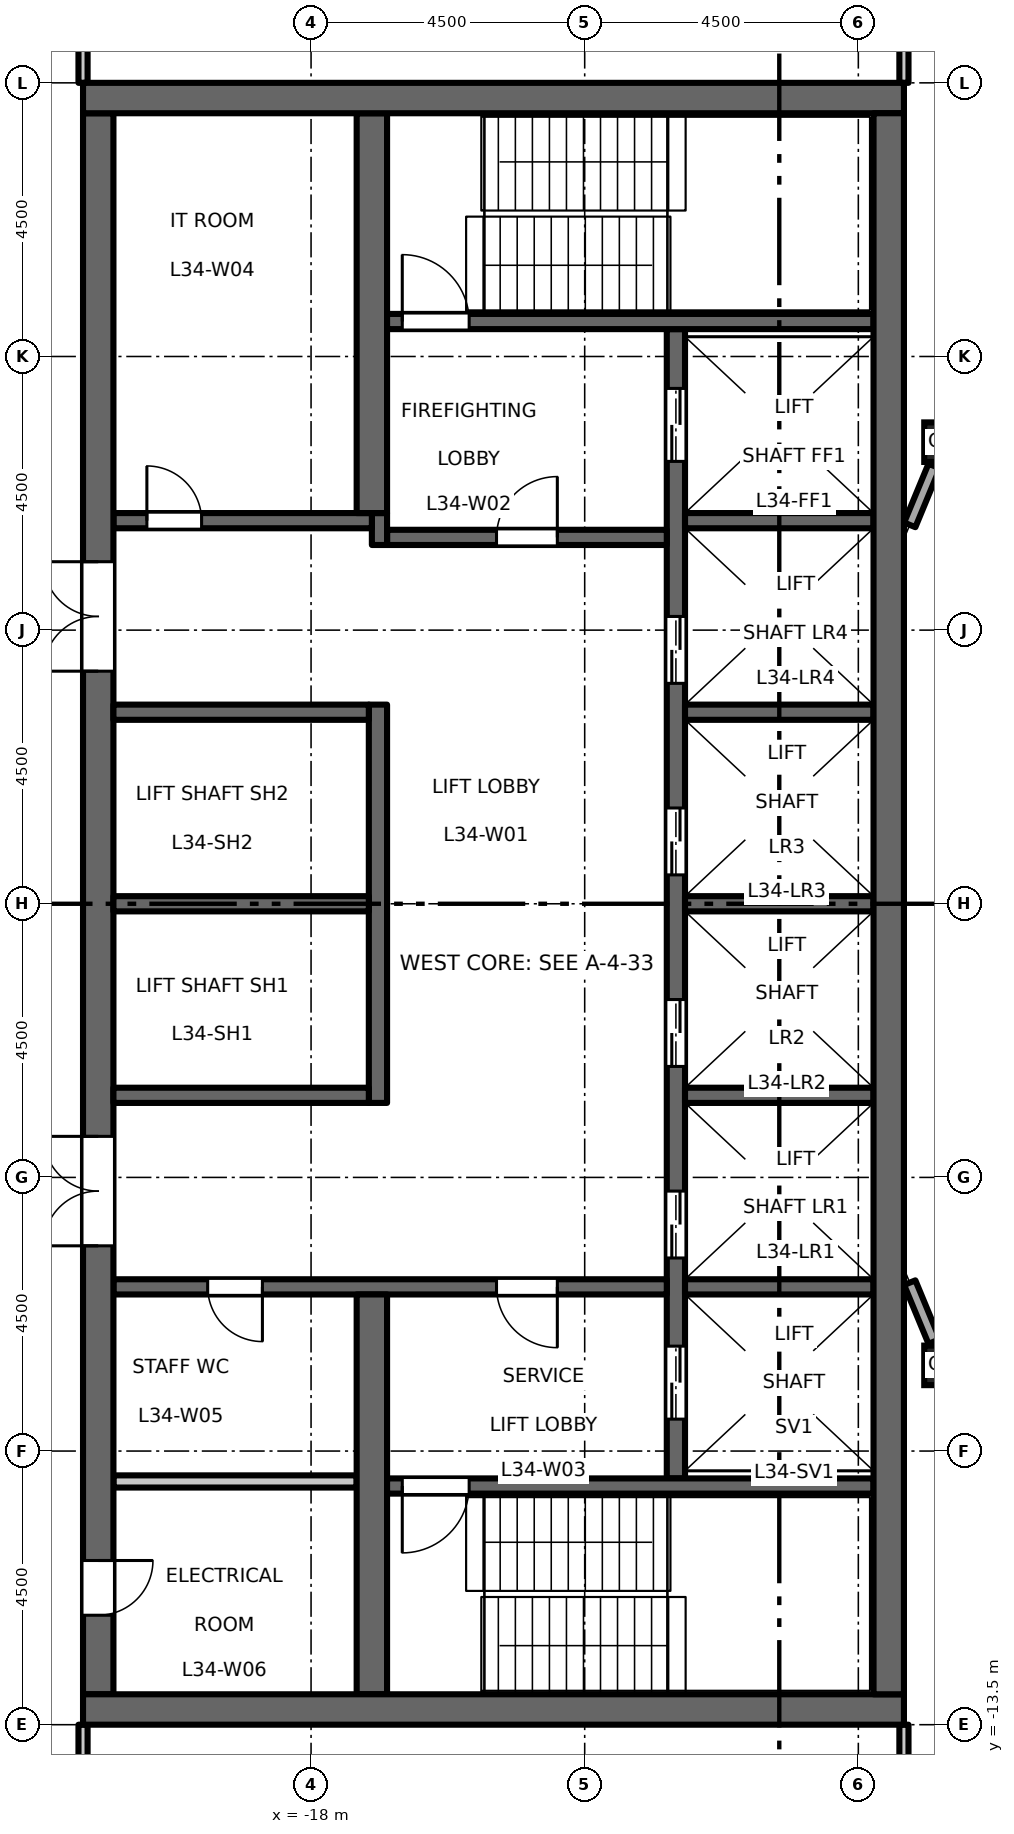
"""IFC4 building model, lengths in metres.
Left out: names, types, materials, properties, quantities, classifications, styles, units other than length and angle.
Written with IfcOpenShell. Run it as: python <this file> out.ifc"""

import sys

from ifc_helpers import new_model, si_unit, direction, frame, frame_2d, origin, origin_2d, place, context, subcontext, project, spatial, rectangle, hollow_rectangle, extrude, element, fill, save


model = new_model("IFC4")
c1 = context("Model", 3, precision=1e-05, world=origin(), true_north=direction((0.0, 1.0)))
c2 = subcontext(c1, "Body", "Model", "MODEL_VIEW")
j1 = project(units=[si_unit("LENGTHUNIT", "METRE"), si_unit("PLANEANGLEUNIT", "RADIAN")], contexts=[c1])
p1 = place(None, origin())
s1 = spatial("IfcSite", under=j1, at=p1, CompositionType="ELEMENT")
p2 = place(p1, origin())
s2 = spatial("IfcBuilding", under=s1, at=p2, CompositionType="ELEMENT")
p3 = place(p2, frame((0.0, 0.0, 158.7)))
s3 = spatial("IfcBuildingStorey", under=s2, at=p3, CompositionType="ELEMENT", Elevation=158.7)
for number, where, z_axis, x_axis in (
    (1, (-7.591, -7.591, 0.0), (0.0, 0.0, 1.0), (1.0, 0.0, 0.0)),
    (2, (-7.591, 7.591, 0.0), (0.0, 0.0, 1.0), (1.0, 0.0, 0.0)),
):
    element("IfcColumn", number, at=place(p3, frame(where, z_axis=z_axis, x_axis=x_axis)), inside=s3, PredefinedType="COLUMN", context=c2, shape_type="SweptSolid", body=[
        extrude(hollow_rectangle(XDim=0.65, YDim=0.65, WallThickness=0.036, at=origin_2d()), origin(), (0.0, 0.0, 1.0), 4.5),
    ])
p4 = place(p3, frame((-12.0, -9.45, 0.0), z_axis=(0.0, 0.0, 1.0), x_axis=(0.0, 1.0, 0.0)))
e3 = element("IfcWall", 3, at=p4, inside=s3, PredefinedType="SHEAR", context=c2, shape_type="SweptSolid", body=[
    extrude(rectangle(XDim=18.9, YDim=0.3, at=frame_2d((9.45, 0.0))), origin(), (0.0, 0.0, 1.0), 4.35),
])
p5 = place(p4, frame((3.625, 0.0, 0.0)))
e4 = element("IfcOpeningElement", 4, at=p5, cuts=e3, PredefinedType="OPENING", context=c2, shape_type="SweptSolid", body=[
    extrude(rectangle(XDim=1.1, YDim=2.1, at=frame_2d((0.55, 1.05))), frame((0.0, 0.16, 0.0), z_axis=(0.0, -1.0, 0.0), x_axis=(1.0, 0.0, 0.0)), (0.0, 0.0, 1.0), 0.32),
])
p6 = place(p4, frame((6.775, 0.0, 0.0)))
e5 = element("IfcOpeningElement", 5, at=p6, cuts=e3, PredefinedType="OPENING", context=c2, shape_type="SweptSolid", body=[
    extrude(rectangle(XDim=1.1, YDim=2.1, at=frame_2d((0.55, 1.05))), frame((0.0, 0.16, 0.0), z_axis=(0.0, -1.0, 0.0), x_axis=(1.0, 0.0, 0.0)), (0.0, 0.0, 1.0), 0.32),
])
p7 = place(p4, frame((9.925, 0.0, 0.0)))
e6 = element("IfcOpeningElement", 6, at=p7, cuts=e3, PredefinedType="OPENING", context=c2, shape_type="SweptSolid", body=[
    extrude(rectangle(XDim=1.1, YDim=2.1, at=frame_2d((0.55, 1.05))), frame((0.0, 0.16, 0.0), z_axis=(0.0, -1.0, 0.0), x_axis=(1.0, 0.0, 0.0)), (0.0, 0.0, 1.0), 0.32),
])
p8 = place(p4, frame((13.075, 0.0, 0.0)))
e7 = element("IfcOpeningElement", 7, at=p8, cuts=e3, PredefinedType="OPENING", context=c2, shape_type="SweptSolid", body=[
    extrude(rectangle(XDim=1.1, YDim=2.1, at=frame_2d((0.55, 1.05))), frame((0.0, 0.16, 0.0), z_axis=(0.0, -1.0, 0.0), x_axis=(1.0, 0.0, 0.0)), (0.0, 0.0, 1.0), 0.32),
])
p9 = place(p4, frame((16.725, 0.0, 0.0)))
e8 = element("IfcOpeningElement", 8, at=p9, cuts=e3, PredefinedType="OPENING", context=c2, shape_type="SweptSolid", body=[
    extrude(rectangle(XDim=1.2, YDim=2.1, at=frame_2d((0.6, 1.05))), frame((0.0, 0.16, 0.0), z_axis=(0.0, -1.0, 0.0), x_axis=(1.0, 0.0, 0.0)), (0.0, 0.0, 1.0), 0.32),
])
p10 = place(p4, frame((0.975, 0.0, 0.0)))
e9 = element("IfcOpeningElement", 9, at=p10, cuts=e3, PredefinedType="OPENING", context=c2, shape_type="SweptSolid", body=[
    extrude(rectangle(XDim=1.2, YDim=2.1, at=frame_2d((0.6, 1.05))), frame((0.0, 0.16, 0.0), z_axis=(0.0, -1.0, 0.0), x_axis=(1.0, 0.0, 0.0)), (0.0, 0.0, 1.0), 0.32),
])
p11 = place(p3, frame((-12.15, 6.025, 0.0), z_axis=(0.0, 0.0, 1.0), x_axis=(-1.0, 0.0, 0.0)))
e10 = element("IfcWall", 10, at=p11, inside=s3, PredefinedType="SHEAR", context=c2, shape_type="SweptSolid", body=[
    extrude(rectangle(XDim=4.6, YDim=0.25, at=frame_2d((2.3, 0.0))), origin(), (0.0, 0.0, 1.0), 4.35),
])
p12 = place(p11, frame((1.8, 0.0, 0.0)))
e11 = element("IfcOpeningElement", 11, at=p12, cuts=e10, PredefinedType="OPENING", context=c2, shape_type="SweptSolid", body=[
    extrude(rectangle(XDim=1.0, YDim=2.1, at=frame_2d((0.5, 1.05))), frame((0.0, 0.135, 0.0), z_axis=(0.0, -1.0, 0.0), x_axis=(1.0, 0.0, 0.0)), (0.0, 0.0, 1.0), 0.27),
])
p13 = place(p3, frame((-16.875, 5.9, 0.0), z_axis=(0.0, 0.0, 1.0), x_axis=(0.0, 1.0, 0.0)))
e12 = element("IfcWall", 12, at=p13, inside=s3, PredefinedType="SHEAR", context=c2, shape_type="SweptSolid", body=[
    extrude(rectangle(XDim=0.525, YDim=0.25, at=frame_2d((0.263, 0.0))), origin(), (0.0, 0.0, 1.0), 4.35),
])
p14 = place(p3, frame((-17.0, 6.3, 0.0), z_axis=(0.0, 0.0, 1.0), x_axis=(-1.0, 0.0, 0.0)))
e13 = element("IfcWall", 13, at=p14, inside=s3, PredefinedType="SHEAR", context=c2, shape_type="SweptSolid", body=[
    extrude(rectangle(XDim=4.25, YDim=0.25, at=frame_2d((2.125, 0.0))), origin(), (0.0, 0.0, 1.0), 4.35),
])
p15 = place(p14, frame((2.8, 0.0, 0.0)))
e14 = element("IfcOpeningElement", 14, at=p15, cuts=e13, PredefinedType="OPENING", context=c2, shape_type="SweptSolid", body=[
    extrude(rectangle(XDim=0.9, YDim=2.1, at=frame_2d((0.45, 1.05))), frame((0.0, 0.135, 0.0), z_axis=(0.0, -1.0, 0.0), x_axis=(1.0, 0.0, 0.0)), (0.0, 0.0, 1.0), 0.27),
])
p16 = place(p3, frame((-12.15, -6.3, 0.0), z_axis=(0.0, 0.0, 1.0), x_axis=(-1.0, 0.0, 0.0)))
e15 = element("IfcWall", 15, at=p16, inside=s3, PredefinedType="SHEAR", context=c2, shape_type="SweptSolid", body=[
    extrude(rectangle(XDim=9.1, YDim=0.25, at=frame_2d((4.55, 0.0))), origin(), (0.0, 0.0, 1.0), 4.35),
])
p17 = place(p16, frame((1.8, 0.0, 0.0)))
e16 = element("IfcOpeningElement", 16, at=p17, cuts=e15, PredefinedType="OPENING", context=c2, shape_type="SweptSolid", body=[
    extrude(rectangle(XDim=1.0, YDim=2.1, at=frame_2d((0.5, 1.05))), frame((0.0, 0.135, 0.0), z_axis=(0.0, -1.0, 0.0), x_axis=(1.0, 0.0, 0.0)), (0.0, 0.0, 1.0), 0.27),
])
p18 = place(p16, frame((6.65, 0.0, 0.0)))
e17 = element("IfcOpeningElement", 17, at=p18, cuts=e15, PredefinedType="OPENING", context=c2, shape_type="SweptSolid", body=[
    extrude(rectangle(XDim=0.9, YDim=2.1, at=frame_2d((0.45, 1.05))), frame((0.0, 0.135, 0.0), z_axis=(0.0, -1.0, 0.0), x_axis=(1.0, 0.0, 0.0)), (0.0, 0.0, 1.0), 0.27),
])
p19 = place(p3, frame((-21.5, -13.0, 0.0), z_axis=(0.0, 0.0, 1.0), x_axis=(0.0, 1.0, 0.0)))
e18 = element("IfcWall", 18, at=p19, inside=s3, PredefinedType="SHEAR", context=c2, shape_type="SweptSolid", body=[
    extrude(rectangle(XDim=26.0, YDim=0.5, at=frame_2d((13.0, 0.0))), origin(), (0.0, 0.0, 1.0), 4.35),
])
p20 = place(p19, frame((16.825, 0.0, 0.0)))
e19 = element("IfcOpeningElement", 19, at=p20, cuts=e18, PredefinedType="OPENING", context=c2, shape_type="SweptSolid", body=[
    extrude(rectangle(XDim=1.8, YDim=2.1, at=frame_2d((0.9, 1.05))), frame((0.0, 0.26, 0.0), z_axis=(0.0, -1.0, 0.0), x_axis=(1.0, 0.0, 0.0)), (0.0, 0.0, 1.0), 0.52),
])
p21 = place(p19, frame((7.375, 0.0, 0.0)))
e20 = element("IfcOpeningElement", 20, at=p21, cuts=e18, PredefinedType="OPENING", context=c2, shape_type="SweptSolid", body=[
    extrude(rectangle(XDim=1.8, YDim=2.1, at=frame_2d((0.9, 1.05))), frame((0.0, 0.26, 0.0), z_axis=(0.0, -1.0, 0.0), x_axis=(1.0, 0.0, 0.0)), (0.0, 0.0, 1.0), 0.52),
])
p22 = place(p19, frame((1.3, 0.0, 0.0)))
e21 = element("IfcOpeningElement", 21, at=p22, cuts=e18, PredefinedType="OPENING", context=c2, shape_type="SweptSolid", body=[
    extrude(rectangle(XDim=0.9, YDim=2.1, at=frame_2d((0.45, 1.05))), frame((0.0, 0.26, 0.0), z_axis=(0.0, -1.0, 0.0), x_axis=(1.0, 0.0, 0.0)), (0.0, 0.0, 1.0), 0.52),
])
p23 = place(p3, frame((-17.25, -9.5, 0.0), z_axis=(0.0, 0.0, 1.0), x_axis=(-1.0, 0.0, 0.0)))
e22 = element("IfcWall", 22, at=p23, inside=s3, PredefinedType="PARTITIONING", context=c2, shape_type="SweptSolid", body=[
    extrude(rectangle(XDim=4.0, YDim=0.2, at=frame_2d((2.0, 0.0))), origin(), (0.0, 0.0, 1.0), 4.35),
])
p24 = place(p3, frame((-16.9, -3.275, 0.0), z_axis=(0.0, 0.0, 1.0), x_axis=(0.0, 1.0, 0.0)))
e23 = element("IfcWall", 23, at=p24, inside=s3, PredefinedType="SHEAR", context=c2, shape_type="SweptSolid", body=[
    extrude(rectangle(XDim=6.55, YDim=0.3, at=frame_2d((3.275, 0.0))), origin(), (0.0, 0.0, 1.0), 4.35),
])
for number, where, z_axis, x_axis in (
    (24, (-17.05, 0.0, 0.0), (0.0, 0.0, 1.0), (-1.0, 0.0, 0.0)),
    (25, (-17.05, 3.15, 0.0), (0.0, 0.0, 1.0), (-1.0, 0.0, 0.0)),
    (26, (-17.05, -3.15, 0.0), (0.0, 0.0, 1.0), (-1.0, 0.0, 0.0)),
):
    element("IfcWall", number, at=place(p3, frame(where, z_axis=z_axis, x_axis=x_axis)), inside=s3, PredefinedType="SHEAR", context=c2, shape_type="SweptSolid", body=[
        extrude(rectangle(XDim=4.2, YDim=0.25, at=frame_2d((2.1, 0.0))), origin(), (0.0, 0.0, 1.0), 4.35),
    ])
for number, where, z_axis, x_axis in (
    (27, (-17.0, 6.425, 0.0), (0.0, 0.0, 1.0), (0.0, 1.0, 0.0)),
    (28, (-17.0, -13.0, 0.0), (0.0, 0.0, 1.0), (0.0, 1.0, 0.0)),
):
    element("IfcWall", number, at=place(p3, frame(where, z_axis=z_axis, x_axis=x_axis)), inside=s3, PredefinedType="SHEAR", context=c2, shape_type="SweptSolid", body=[
        extrude(rectangle(XDim=6.575, YDim=0.5, at=frame_2d((3.288, 0.0))), origin(), (0.0, 0.0, 1.0), 4.35),
    ])
for number, where, z_axis, x_axis in (
    (29, (-8.75, 0.0, 0.0), (0.0, 0.0, 1.0), (-1.0, 0.0, 0.0)),
    (30, (-8.75, 3.15, 0.0), (0.0, 0.0, 1.0), (-1.0, 0.0, 0.0)),
    (31, (-8.75, 6.3, 0.0), (0.0, 0.0, 1.0), (-1.0, 0.0, 0.0)),
    (32, (-8.75, -3.15, 0.0), (0.0, 0.0, 1.0), (-1.0, 0.0, 0.0)),
    (33, (-8.75, -6.3, 0.0), (0.0, 0.0, 1.0), (-1.0, 0.0, 0.0)),
):
    element("IfcWall", number, at=place(p3, frame(where, z_axis=z_axis, x_axis=x_axis)), inside=s3, PredefinedType="SHEAR", context=c2, shape_type="SweptSolid", body=[
        extrude(rectangle(XDim=3.1, YDim=0.25, at=frame_2d((1.55, 0.0))), origin(), (0.0, 0.0, 1.0), 4.35),
    ])
p25 = place(p3, frame((-8.75, 9.575, 0.0), z_axis=(0.0, 0.0, 1.0), x_axis=(-1.0, 0.0, 0.0)))
e34 = element("IfcWall", 34, at=p25, inside=s3, PredefinedType="SHEAR", context=c2, shape_type="SweptSolid", body=[
    extrude(rectangle(XDim=8.0, YDim=0.25, at=frame_2d((4.0, 0.0))), origin(), (0.0, 0.0, 1.0), 4.35),
])
p26 = place(p25, frame((6.65, 0.0, 0.0)))
e35 = element("IfcOpeningElement", 35, at=p26, cuts=e34, PredefinedType="OPENING", context=c2, shape_type="SweptSolid", body=[
    extrude(rectangle(XDim=1.1, YDim=2.1, at=frame_2d((0.55, 1.05))), frame((0.0, 0.135, 0.0), z_axis=(0.0, -1.0, 0.0), x_axis=(1.0, 0.0, 0.0)), (0.0, 0.0, 1.0), 0.27),
])
p27 = place(p3, frame((-8.75, -9.575, 0.0), z_axis=(0.0, 0.0, 1.0), x_axis=(-1.0, 0.0, 0.0)))
e36 = element("IfcWall", 36, at=p27, inside=s3, PredefinedType="SHEAR", context=c2, shape_type="SweptSolid", body=[
    extrude(rectangle(XDim=8.0, YDim=0.25, at=frame_2d((4.0, 0.0))), origin(), (0.0, 0.0, 1.0), 4.35),
])
p28 = place(p27, frame((6.65, 0.0, 0.0)))
e37 = element("IfcOpeningElement", 37, at=p28, cuts=e36, PredefinedType="OPENING", context=c2, shape_type="SweptSolid", body=[
    extrude(rectangle(XDim=1.1, YDim=2.1, at=frame_2d((0.55, 1.05))), frame((0.0, 0.135, 0.0), z_axis=(0.0, -1.0, 0.0), x_axis=(1.0, 0.0, 0.0)), (0.0, 0.0, 1.0), 0.27),
])
for number, where, z_axis, x_axis in (
    (38, (-8.25, 13.25, 0.0), (0.0, 0.0, 1.0), (-1.0, 0.0, 0.0)),
    (39, (-8.25, -13.25, 0.0), (0.0, 0.0, 1.0), (-1.0, 0.0, 0.0)),
):
    element("IfcWall", number, at=place(p3, frame(where, z_axis=z_axis, x_axis=x_axis)), inside=s3, PredefinedType="SHEAR", context=c2, shape_type="SweptSolid", body=[
        extrude(rectangle(XDim=13.5, YDim=0.5, at=frame_2d((6.75, 0.0))), origin(), (0.0, 0.0, 1.0), 4.35),
    ])
p29 = place(p3, frame((-8.5, -13.0, 0.0), z_axis=(0.0, 0.0, 1.0), x_axis=(0.0, 1.0, 0.0)))
e40 = element("IfcWall", 40, at=p29, inside=s3, PredefinedType="SHEAR", context=c2, shape_type="SweptSolid", body=[
    extrude(rectangle(XDim=26.0, YDim=0.5, at=frame_2d((13.0, 0.0))), origin(), (0.0, 0.0, 1.0), 4.35),
])
for number, where, z_axis, x_axis in (
    (41, (-7.753, 7.199, 0.0), (0.0, 0.0, 1.0), (-0.383, -0.924, 0.0)),
    (42, (-8.154, -6.231, 0.0), (0.0, 0.0, 1.0), (0.383, -0.924, 0.0)),
):
    element("IfcWall", number, at=place(p3, frame(where, z_axis=z_axis, x_axis=x_axis)), inside=s3, PredefinedType="STANDARD", context=c2, shape_type="SweptSolid", body=[
        extrude(rectangle(XDim=1.048, YDim=0.2, at=frame_2d((0.524, 0.0))), origin(), (0.0, 0.0, 1.0), 3.826),
    ])
for number, where, z_axis, x_axis in (
    (43, (-21.75, -17.925, 0.0), (0.0, 0.0, 1.0), (0.0, 1.0, 0.0)),
    (44, (-21.75, 13.5, 0.0), (0.0, 0.0, 1.0), (0.0, 1.0, 0.0)),
    (45, (-8.25, -17.925, 0.0), (0.0, 0.0, 1.0), (0.0, 1.0, 0.0)),
    (46, (-8.25, 13.5, 0.0), (0.0, 0.0, 1.0), (0.0, 1.0, 0.0)),
):
    element("IfcWall", number, at=place(p3, frame(where, z_axis=z_axis, x_axis=x_axis)), inside=s3, PredefinedType="PARTITIONING", context=c2, shape_type="SweptSolid", body=[
        extrude(rectangle(XDim=4.425, YDim=0.15, at=frame_2d((2.212, 0.0))), origin(), (0.0, 0.0, 1.0), 4.35),
    ])
p30 = place(p12, origin())
e47 = element("IfcDoor", 47, at=p30, inside=s3, OperationType="SINGLE_SWING_LEFT", PredefinedType="DOOR", context=c2, shape_type="SweptSolid", body=[
    extrude(rectangle(XDim=1.0, YDim=2.1, at=frame_2d((0.5, 1.05))), frame((0.0, 0.025, 0.0), z_axis=(0.0, -1.0, 0.0), x_axis=(1.0, 0.0, 0.0)), (0.0, 0.0, 1.0), 0.05),
])
fill(e11, e47)
p31 = place(p17, origin())
e48 = element("IfcDoor", 48, at=p31, inside=s3, OperationType="SINGLE_SWING_RIGHT", PredefinedType="DOOR", context=c2, shape_type="SweptSolid", body=[
    extrude(rectangle(XDim=1.0, YDim=2.1, at=frame_2d((0.5, 1.05))), frame((0.0, 0.025, 0.0), z_axis=(0.0, -1.0, 0.0), x_axis=(1.0, 0.0, 0.0)), (0.0, 0.0, 1.0), 0.05),
])
fill(e16, e48)
p32 = place(p26, origin())
e49 = element("IfcDoor", 49, at=p32, inside=s3, OperationType="SINGLE_SWING_RIGHT", PredefinedType="DOOR", context=c2, shape_type="SweptSolid", body=[
    extrude(rectangle(XDim=1.1, YDim=2.1, at=frame_2d((0.55, 1.05))), frame((0.0, 0.025, 0.0), z_axis=(0.0, -1.0, 0.0), x_axis=(1.0, 0.0, 0.0)), (0.0, 0.0, 1.0), 0.05),
])
fill(e35, e49)
p33 = place(p28, origin())
e50 = element("IfcDoor", 50, at=p33, inside=s3, OperationType="SINGLE_SWING_LEFT", PredefinedType="DOOR", context=c2, shape_type="SweptSolid", body=[
    extrude(rectangle(XDim=1.1, YDim=2.1, at=frame_2d((0.55, 1.05))), frame((0.0, 0.025, 0.0), z_axis=(0.0, -1.0, 0.0), x_axis=(1.0, 0.0, 0.0)), (0.0, 0.0, 1.0), 0.05),
])
fill(e37, e50)
p34 = place(p20, origin())
e51 = element("IfcDoor", 51, at=p34, inside=s3, OperationType="DOUBLE_DOOR_DOUBLE_SWING", PredefinedType="DOOR", context=c2, shape_type="SweptSolid", body=[
    extrude(rectangle(XDim=1.8, YDim=2.1, at=frame_2d((0.9, 1.05))), frame((0.0, 0.025, 0.0), z_axis=(0.0, -1.0, 0.0), x_axis=(1.0, 0.0, 0.0)), (0.0, 0.0, 1.0), 0.05),
])
fill(e19, e51)
p35 = place(p21, origin())
e52 = element("IfcDoor", 52, at=p35, inside=s3, OperationType="DOUBLE_DOOR_DOUBLE_SWING", PredefinedType="DOOR", context=c2, shape_type="SweptSolid", body=[
    extrude(rectangle(XDim=1.8, YDim=2.1, at=frame_2d((0.9, 1.05))), frame((0.0, 0.025, 0.0), z_axis=(0.0, -1.0, 0.0), x_axis=(1.0, 0.0, 0.0)), (0.0, 0.0, 1.0), 0.05),
])
fill(e20, e52)
p36 = place(p5, origin())
e53 = element("IfcDoor", 53, at=p36, inside=s3, OperationType="DOUBLE_DOOR_SLIDING", PredefinedType="DOOR", context=c2, shape_type="SweptSolid", body=[
    extrude(rectangle(XDim=1.1, YDim=2.1, at=frame_2d((0.55, 1.05))), frame((0.0, 0.025, 0.0), z_axis=(0.0, -1.0, 0.0), x_axis=(1.0, 0.0, 0.0)), (0.0, 0.0, 1.0), 0.05),
])
fill(e4, e53)
p37 = place(p6, origin())
e54 = element("IfcDoor", 54, at=p37, inside=s3, OperationType="DOUBLE_DOOR_SLIDING", PredefinedType="DOOR", context=c2, shape_type="SweptSolid", body=[
    extrude(rectangle(XDim=1.1, YDim=2.1, at=frame_2d((0.55, 1.05))), frame((0.0, 0.025, 0.0), z_axis=(0.0, -1.0, 0.0), x_axis=(1.0, 0.0, 0.0)), (0.0, 0.0, 1.0), 0.05),
])
fill(e5, e54)
p38 = place(p7, origin())
e55 = element("IfcDoor", 55, at=p38, inside=s3, OperationType="DOUBLE_DOOR_SLIDING", PredefinedType="DOOR", context=c2, shape_type="SweptSolid", body=[
    extrude(rectangle(XDim=1.1, YDim=2.1, at=frame_2d((0.55, 1.05))), frame((0.0, 0.025, 0.0), z_axis=(0.0, -1.0, 0.0), x_axis=(1.0, 0.0, 0.0)), (0.0, 0.0, 1.0), 0.05),
])
fill(e6, e55)
p39 = place(p8, origin())
e56 = element("IfcDoor", 56, at=p39, inside=s3, OperationType="DOUBLE_DOOR_SLIDING", PredefinedType="DOOR", context=c2, shape_type="SweptSolid", body=[
    extrude(rectangle(XDim=1.1, YDim=2.1, at=frame_2d((0.55, 1.05))), frame((0.0, 0.025, 0.0), z_axis=(0.0, -1.0, 0.0), x_axis=(1.0, 0.0, 0.0)), (0.0, 0.0, 1.0), 0.05),
])
fill(e7, e56)
p40 = place(p9, origin())
e57 = element("IfcDoor", 57, at=p40, inside=s3, OperationType="DOUBLE_DOOR_SLIDING", PredefinedType="DOOR", context=c2, shape_type="SweptSolid", body=[
    extrude(rectangle(XDim=1.2, YDim=2.1, at=frame_2d((0.6, 1.05))), frame((0.0, 0.025, 0.0), z_axis=(0.0, -1.0, 0.0), x_axis=(1.0, 0.0, 0.0)), (0.0, 0.0, 1.0), 0.05),
])
fill(e8, e57)
p41 = place(p10, origin())
e58 = element("IfcDoor", 58, at=p41, inside=s3, OperationType="DOUBLE_DOOR_SLIDING", PredefinedType="DOOR", context=c2, shape_type="SweptSolid", body=[
    extrude(rectangle(XDim=1.2, YDim=2.1, at=frame_2d((0.6, 1.05))), frame((0.0, 0.025, 0.0), z_axis=(0.0, -1.0, 0.0), x_axis=(1.0, 0.0, 0.0)), (0.0, 0.0, 1.0), 0.05),
])
fill(e9, e58)
p42 = place(p15, origin())
e59 = element("IfcDoor", 59, at=p42, inside=s3, OperationType="SINGLE_SWING_RIGHT", PredefinedType="DOOR", context=c2, shape_type="SweptSolid", body=[
    extrude(rectangle(XDim=0.9, YDim=2.1, at=frame_2d((0.45, 1.05))), frame((0.0, 0.025, 0.0), z_axis=(0.0, -1.0, 0.0), x_axis=(1.0, 0.0, 0.0)), (0.0, 0.0, 1.0), 0.05),
])
fill(e14, e59)
p43 = place(p18, origin())
e60 = element("IfcDoor", 60, at=p43, inside=s3, OperationType="SINGLE_SWING_RIGHT", PredefinedType="DOOR", context=c2, shape_type="SweptSolid", body=[
    extrude(rectangle(XDim=0.9, YDim=2.1, at=frame_2d((0.45, 1.05))), frame((0.0, 0.025, 0.0), z_axis=(0.0, -1.0, 0.0), x_axis=(1.0, 0.0, 0.0)), (0.0, 0.0, 1.0), 0.05),
])
fill(e17, e60)
p44 = place(p22, origin())
e61 = element("IfcDoor", 61, at=p44, inside=s3, OperationType="SINGLE_SWING_RIGHT", PredefinedType="DOOR", context=c2, shape_type="SweptSolid", body=[
    extrude(rectangle(XDim=0.9, YDim=2.1, at=frame_2d((0.45, 1.05))), frame((0.0, 0.025, 0.0), z_axis=(0.0, -1.0, 0.0), x_axis=(1.0, 0.0, 0.0)), (0.0, 0.0, 1.0), 0.05),
])
fill(e21, e61)
save(model, sys.argv[1])
